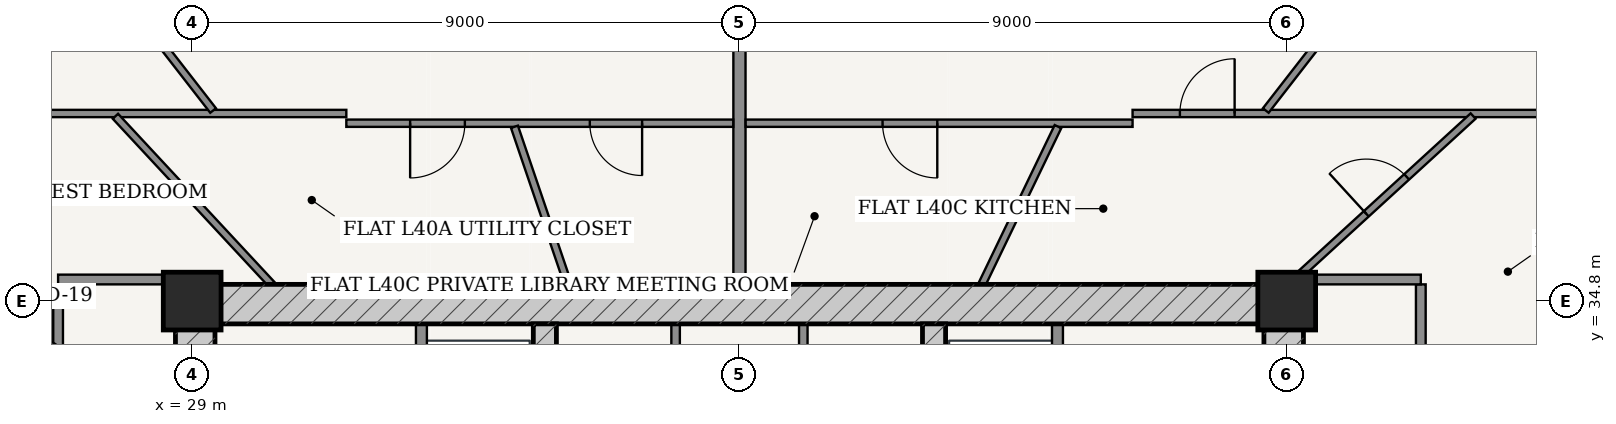
"""IFC4 building model, lengths in metres.
Left out: names, types, materials, properties, quantities, classifications, styles, units other than length and angle.
Written with IfcOpenShell. Run it as: python <this file> out.ifc"""

import sys

from ifc_helpers import new_model, si_unit, direction, frame, frame_2d, origin, origin_2d, place, context, subcontext, project, spatial, rectangle, extrude, source, transform, mapped, element, fill, save


model = new_model("IFC4")
c1 = context("Model", 3, precision=1e-05, world=origin(), true_north=direction((-0.2419218956, 0.970295726276)))
c2 = subcontext(c1, "Body", "Model", "MODEL_VIEW")
j1 = project(units=[si_unit("LENGTHUNIT", "METRE"), si_unit("PLANEANGLEUNIT", "RADIAN")], contexts=[c1])
p1 = place(None, origin())
s1 = spatial("IfcSite", under=j1, at=p1, CompositionType="ELEMENT")
p2 = place(p1, origin())
s2 = spatial("IfcBuilding", under=s1, at=p2, CompositionType="ELEMENT")
p3 = place(p2, frame((0.0, 0.0, 153.4)))
s3 = spatial("IfcBuildingStorey", under=s2, at=p3, CompositionType="ELEMENT", Elevation=153.4)
for number, where, z_axis, x_axis in (
    (1, (47.0, 34.8, 0.0), (0.0, 0.0, 1.0), (1.0, 0.0, 0.0)),
    (2, (29.0, 34.8, 0.0), (0.0, 0.0, 1.0), (1.0, 0.0, 0.0)),
):
    element("IfcColumn", number, at=place(p3, frame(where, z_axis=z_axis, x_axis=x_axis)), inside=s3, PredefinedType="COLUMN", context=c2, shape_type="SweptSolid", body=[
        extrude(rectangle(XDim=0.95, YDim=0.95, at=origin_2d()), origin(), (0.0, 0.0, 1.0), 3.6),
    ])
p4 = place(p3, frame((28.725, 34.75, 0.0), z_axis=(0.0, 0.0, 1.0), x_axis=(1.0, 0.0, 0.0)))
e3 = element("IfcWall", 3, at=p4, inside=s3, PredefinedType="SHEAR", context=c2, shape_type="SweptSolid", body=[
    extrude(rectangle(XDim=18.55, YDim=0.65, at=frame_2d((9.275, 0.0))), origin(), (0.0, 0.0, 1.0), 3.33),
])
p5 = place(p3, frame((29.05, 19.175, 0.0), z_axis=(0.0, 0.0, 1.0), x_axis=(0.0, 1.0, 0.0)))
e4 = element("IfcWall", 4, at=p5, inside=s3, PredefinedType="SHEAR", context=c2, shape_type="SweptSolid", body=[
    extrude(rectangle(XDim=15.25, YDim=0.65, at=frame_2d((7.625, 0.0))), origin(), (0.0, 0.0, 1.0), 3.33),
])
p6 = place(p5, frame((9.875, 0.0, 0.0)))
e5 = element("IfcOpeningElement", 5, at=p6, cuts=e4, PredefinedType="OPENING", context=c2, shape_type="SweptSolid", body=[
    extrude(rectangle(XDim=1.5, YDim=2.2, at=frame_2d((0.75, 1.1))), frame((0.0, 0.335, 0.0), z_axis=(0.0, -1.0, 0.0), x_axis=(1.0, 0.0, 0.0)), (0.0, 0.0, 1.0), 0.67),
])
p7 = place(p3, frame((46.95, 19.175, 0.0), z_axis=(0.0, 0.0, 1.0), x_axis=(0.0, 1.0, 0.0)))
e6 = element("IfcWall", 6, at=p7, inside=s3, PredefinedType="SHEAR", context=c2, shape_type="SweptSolid", body=[
    extrude(rectangle(XDim=15.25, YDim=0.65, at=frame_2d((7.625, 0.0))), origin(), (0.0, 0.0, 1.0), 3.33),
])
p8 = place(p7, frame((9.875, 0.0, 0.0)))
e7 = element("IfcOpeningElement", 7, at=p8, cuts=e6, PredefinedType="OPENING", context=c2, shape_type="SweptSolid", body=[
    extrude(rectangle(XDim=1.5, YDim=2.2, at=frame_2d((0.75, 1.1))), frame((0.0, 0.335, 0.0), z_axis=(0.0, -1.0, 0.0), x_axis=(1.0, 0.0, 0.0)), (0.0, 0.0, 1.0), 0.67),
])
p9 = place(p3, frame((34.8, 19.175, 0.0), z_axis=(0.0, 0.0, 1.0), x_axis=(0.0, 1.0, 0.0)))
e8 = element("IfcWall", 8, at=p9, inside=s3, PredefinedType="SHEAR", context=c2, shape_type="SweptSolid", body=[
    extrude(rectangle(XDim=15.25, YDim=0.38, at=frame_2d((7.625, 0.0))), origin(), (0.0, 0.0, 1.0), 3.33),
])
p10 = place(p9, frame((7.8, 0.0, 0.0)))
e9 = element("IfcOpeningElement", 9, at=p10, cuts=e8, PredefinedType="OPENING", context=c2, shape_type="SweptSolid", body=[
    extrude(rectangle(XDim=1.05, YDim=2.15, at=frame_2d((0.525, 1.075))), frame((0.0, 0.2, 0.0), z_axis=(0.0, -1.0, 0.0), x_axis=(1.0, 0.0, 0.0)), (0.0, 0.0, 1.0), 0.4),
])
p11 = place(p3, frame((41.2, 19.175, 0.0), z_axis=(0.0, 0.0, 1.0), x_axis=(0.0, 1.0, 0.0)))
e10 = element("IfcWall", 10, at=p11, inside=s3, PredefinedType="SHEAR", context=c2, shape_type="SweptSolid", body=[
    extrude(rectangle(XDim=15.25, YDim=0.38, at=frame_2d((7.625, 0.0))), origin(), (0.0, 0.0, 1.0), 3.33),
])
p12 = place(p11, frame((7.8, 0.0, 0.0)))
e11 = element("IfcOpeningElement", 11, at=p12, cuts=e10, PredefinedType="OPENING", context=c2, shape_type="SweptSolid", body=[
    extrude(rectangle(XDim=1.05, YDim=2.15, at=frame_2d((0.525, 1.075))), frame((0.0, 0.2, 0.0), z_axis=(0.0, -1.0, 0.0), x_axis=(1.0, 0.0, 0.0)), (0.0, 0.0, 1.0), 0.4),
])
p13 = place(p3, frame((32.77, 28.52, 0.0), z_axis=(0.0, 0.0, 1.0), x_axis=(0.0, 1.0, 0.0)))
e12 = element("IfcWall", 12, at=p13, inside=s3, PredefinedType="PARTITIONING", context=c2, shape_type="SweptSolid", body=[
    extrude(rectangle(XDim=5.905, YDim=0.18, at=frame_2d((2.953, 0.0))), origin(), (0.0, 0.0, 1.0), 3.33),
])
p14 = place(p13, frame((3.655, 0.0, 0.0)))
e13 = element("IfcOpeningElement", 13, at=p14, cuts=e12, PredefinedType="OPENING", context=c2, shape_type="SweptSolid", body=[
    extrude(rectangle(XDim=1.15, YDim=2.2, at=frame_2d((0.575, 1.1))), frame((0.0, 0.1, 0.0), z_axis=(0.0, -1.0, 0.0), x_axis=(1.0, 0.0, 0.0)), (0.0, 0.0, 1.0), 0.2),
])
p15 = place(p13, frame((0.73, 0.0, 0.0)))
e14 = element("IfcOpeningElement", 14, at=p15, cuts=e12, PredefinedType="OPENING", context=c2, shape_type="SweptSolid", body=[
    extrude(rectangle(XDim=1.2, YDim=2.25, at=frame_2d((0.6, 1.125))), frame((0.0, 0.1, 0.0), z_axis=(0.0, -1.0, 0.0), x_axis=(1.0, 0.0, 0.0)), (0.0, 0.0, 1.0), 0.2),
])
p16 = place(p3, frame((43.23, 28.52, 0.0), z_axis=(0.0, 0.0, 1.0), x_axis=(0.0, 1.0, 0.0)))
e15 = element("IfcWall", 15, at=p16, inside=s3, PredefinedType="PARTITIONING", context=c2, shape_type="SweptSolid", body=[
    extrude(rectangle(XDim=5.905, YDim=0.18, at=frame_2d((2.953, 0.0))), origin(), (0.0, 0.0, 1.0), 3.33),
])
p17 = place(p16, frame((0.905, 0.0, 0.0)))
e16 = element("IfcOpeningElement", 16, at=p17, cuts=e15, PredefinedType="OPENING", context=c2, shape_type="SweptSolid", body=[
    extrude(rectangle(XDim=0.85, YDim=2.1, at=frame_2d((0.425, 1.05))), frame((0.0, 0.1, 0.0), z_axis=(0.0, -1.0, 0.0), x_axis=(1.0, 0.0, 0.0)), (0.0, 0.0, 1.0), 0.2),
])
p18 = place(p16, frame((3.655, 0.0, 0.0)))
e17 = element("IfcOpeningElement", 17, at=p18, cuts=e15, PredefinedType="OPENING", context=c2, shape_type="SweptSolid", body=[
    extrude(rectangle(XDim=1.15, YDim=2.2, at=frame_2d((0.575, 1.1))), frame((0.0, 0.1, 0.0), z_axis=(0.0, -1.0, 0.0), x_axis=(1.0, 0.0, 0.0)), (0.0, 0.0, 1.0), 0.2),
])
for number, where, z_axis, x_axis in (
    (18, (36.95, 28.56, 0.0), (0.0, 0.0, 1.0), (0.0, 1.0, 0.0)),
    (19, (39.05, 28.56, 0.0), (0.0, 0.0, 1.0), (0.0, 1.0, 0.0)),
):
    element("IfcWall", number, at=place(p3, frame(where, z_axis=z_axis, x_axis=x_axis)), inside=s3, PredefinedType="PARTITIONING", context=c2, shape_type="SweptSolid", body=[
        extrude(rectangle(XDim=5.865, YDim=0.14, at=frame_2d((2.933, 0.0))), origin(), (0.0, 0.0, 1.0), 3.33),
    ])
p19 = place(p3, frame((26.795, 24.4, 0.0), z_axis=(0.0, 0.0, 1.0), x_axis=(0.0, 1.0, 0.0)))
e20 = element("IfcWall", 20, at=p19, inside=s3, PredefinedType="PARTITIONING", context=c2, shape_type="SweptSolid", body=[
    extrude(rectangle(XDim=10.675, YDim=0.16, at=frame_2d((5.337, 0.0))), origin(), (0.0, 0.0, 1.0), 2.776),
])
p20 = place(p19, frame((6.702, 0.0, 0.0)))
e21 = element("IfcOpeningElement", 21, at=p20, cuts=e20, PredefinedType="OPENING", context=c2, shape_type="SweptSolid", body=[
    extrude(rectangle(XDim=0.98, YDim=2.2, at=frame_2d((0.49, 1.1))), frame((0.0, 0.09, 0.0), z_axis=(0.0, -1.0, 0.0), x_axis=(1.0, 0.0, 0.0)), (0.0, 0.0, 1.0), 0.18),
])
p21 = place(p3, frame((26.795, 35.155, 0.0), z_axis=(0.0, 0.0, 1.0), x_axis=(1.0, 0.0, 0.0)))
e22 = element("IfcWall", 22, at=p21, inside=s3, PredefinedType="PARTITIONING", context=c2, shape_type="SweptSolid", body=[
    extrude(rectangle(XDim=1.93, YDim=0.16, at=frame_2d((0.965, 0.0))), origin(), (0.0, 0.0, 1.0), 2.776),
])
p22 = place(p3, frame((49.205, 16.675, 0.0), z_axis=(0.0, 0.0, 1.0), x_axis=(0.0, 1.0, 0.0)))
e23 = element("IfcWall", 23, at=p22, inside=s3, PredefinedType="PARTITIONING", context=c2, shape_type="SweptSolid", body=[
    extrude(rectangle(XDim=18.4, YDim=0.16, at=frame_2d((9.2, 0.0))), origin(), (0.0, 0.0, 1.0), 2.776),
])
p23 = place(p22, frame((15.299, 0.0, 0.0)))
e24 = element("IfcOpeningElement", 24, at=p23, cuts=e23, PredefinedType="OPENING", context=c2, shape_type="SweptSolid", body=[
    extrude(rectangle(XDim=0.98, YDim=2.2, at=frame_2d((0.49, 1.1))), frame((0.0, 0.09, 0.0), z_axis=(0.0, -1.0, 0.0), x_axis=(1.0, 0.0, 0.0)), (0.0, 0.0, 1.0), 0.18),
])
p24 = place(p3, frame((47.275, 35.155, 0.0), z_axis=(0.0, 0.0, 1.0), x_axis=(1.0, 0.0, 0.0)))
e25 = element("IfcWall", 25, at=p24, inside=s3, PredefinedType="PARTITIONING", context=c2, shape_type="SweptSolid", body=[
    extrude(rectangle(XDim=1.93, YDim=0.16, at=frame_2d((0.965, 0.0))), origin(), (0.0, 0.0, 1.0), 2.776),
])
p25 = place(p3, frame((38.0, 35.075, 0.0), z_axis=(0.0, 0.0, 1.0), x_axis=(0.0, 1.0, 0.0)))
e26 = element("IfcWall", 26, at=p25, inside=s3, PredefinedType="PARTITIONING", context=c2, shape_type="SweptSolid", body=[
    extrude(rectangle(XDim=12.465, YDim=0.2, at=frame_2d((6.232, 0.0))), origin(), (0.0, 0.0, 1.0), 2.415),
])
p26 = place(p3, frame((24.065, 37.885, 0.0), z_axis=(0.0, 0.0, 1.0), x_axis=(1.0, 0.0, 0.0)))
e27 = element("IfcWall", 27, at=p26, inside=s3, PredefinedType="PARTITIONING", context=c2, shape_type="SweptSolid", body=[
    extrude(rectangle(XDim=7.47, YDim=0.12, at=frame_2d((3.735, 0.0))), origin(), (0.0, 0.0, 1.0), 2.776),
])
p27 = place(p3, frame((31.535, 37.725, 0.0), z_axis=(0.0, 0.0, 1.0), x_axis=(1.0, 0.0, 0.0)))
e28 = element("IfcWall", 28, at=p27, inside=s3, PredefinedType="PARTITIONING", context=c2, shape_type="SweptSolid", body=[
    extrude(rectangle(XDim=6.363, YDim=0.12, at=frame_2d((3.182, 0.0))), origin(), (0.0, 0.0, 1.0), 2.776),
])
p28 = place(p27, frame((4.004, 0.0, 0.0)))
e29 = element("IfcOpeningElement", 29, at=p28, cuts=e28, PredefinedType="OPENING", context=c2, shape_type="SweptSolid", body=[
    extrude(rectangle(XDim=0.86, YDim=2.15, at=frame_2d((0.43, 1.075))), frame((0.0, 0.07, 0.0), z_axis=(0.0, -1.0, 0.0), x_axis=(1.0, 0.0, 0.0)), (0.0, 0.0, 1.0), 0.14),
])
p29 = place(p27, frame((1.049, 0.0, 0.0)))
e30 = element("IfcOpeningElement", 30, at=p29, cuts=e28, PredefinedType="OPENING", context=c2, shape_type="SweptSolid", body=[
    extrude(rectangle(XDim=0.9, YDim=2.15, at=frame_2d((0.45, 1.075))), frame((0.0, 0.07, 0.0), z_axis=(0.0, -1.0, 0.0), x_axis=(1.0, 0.0, 0.0)), (0.0, 0.0, 1.0), 0.14),
])
p30 = place(p3, frame((29.344, 37.934, 0.0), z_axis=(0.0, 0.0, 1.0), x_axis=(-0.613758289074, 0.789493991487, 0.0)))
e31 = element("IfcWall", 31, at=p30, inside=s3, PredefinedType="PARTITIONING", context=c2, shape_type="SweptSolid", body=[
    extrude(rectangle(XDim=7.695, YDim=0.12, at=frame_2d((3.848, 0.0))), origin(), (0.0, 0.0, 1.0), 2.776),
])
p31 = place(p30, frame((2.399, 0.0, 0.0)))
e32 = element("IfcOpeningElement", 32, at=p31, cuts=e31, PredefinedType="OPENING", context=c2, shape_type="SweptSolid", body=[
    extrude(rectangle(XDim=0.9, YDim=2.15, at=frame_2d((0.45, 1.075))), frame((0.0, 0.07, 0.0), z_axis=(0.0, -1.0, 0.0), x_axis=(1.0, 0.0, 0.0)), (0.0, 0.0, 1.0), 0.14),
])
p32 = place(p3, frame((35.182, 35.075, 0.0), z_axis=(0.0, 0.0, 1.0), x_axis=(-0.322321614946, 0.946630221649, 0.0)))
e33 = element("IfcWall", 33, at=p32, inside=s3, PredefinedType="PARTITIONING", context=c2, shape_type="SweptSolid", body=[
    extrude(rectangle(XDim=2.737, YDim=0.12, at=frame_2d((1.369, 0.0))), origin(), (0.0, 0.0, 1.0), 2.415),
])
p33 = place(p3, frame((30.307, 35.075, 0.0), z_axis=(0.0, 0.0, 1.0), x_axis=(-0.68082810609, 0.732443233267, 0.0)))
e34 = element("IfcWall", 34, at=p33, inside=s3, PredefinedType="PARTITIONING", context=c2, shape_type="SweptSolid", body=[
    extrude(rectangle(XDim=3.775, YDim=0.12, at=frame_2d((1.887, 0.0))), origin(), (0.0, 0.0, 1.0), 2.776),
])
p34 = place(p3, frame((26.715, 34.043, 0.0), z_axis=(0.0, 0.0, 1.0), x_axis=(-0.841597086151, 0.540105864235, 0.0)))
e35 = element("IfcWall", 35, at=p34, inside=s3, PredefinedType="PARTITIONING", context=c2, shape_type="SweptSolid", body=[
    extrude(rectangle(XDim=3.087, YDim=0.12, at=frame_2d((1.543, 0.0))), origin(), (0.0, 0.0, 1.0), 3.005),
])
p35 = place(p34, frame((1.113, 0.0, 0.0)))
e36 = element("IfcOpeningElement", 36, at=p35, cuts=e35, PredefinedType="OPENING", context=c2, shape_type="SweptSolid", body=[
    extrude(rectangle(XDim=0.86, YDim=2.15, at=frame_2d((0.43, 1.075))), frame((0.0, 0.07, 0.0), z_axis=(0.0, -1.0, 0.0), x_axis=(1.0, 0.0, 0.0)), (0.0, 0.0, 1.0), 0.14),
])
p36 = place(p3, frame((38.102, 37.725, 0.0), z_axis=(0.0, 0.0, 1.0), x_axis=(1.0, 0.0, 0.0)))
e37 = element("IfcWall", 37, at=p36, inside=s3, PredefinedType="PARTITIONING", context=c2, shape_type="SweptSolid", body=[
    extrude(rectangle(XDim=6.363, YDim=0.12, at=frame_2d((3.182, 0.0))), origin(), (0.0, 0.0, 1.0), 2.776),
])
p37 = place(p36, frame((2.251, 0.0, 0.0)))
e38 = element("IfcOpeningElement", 38, at=p37, cuts=e37, PredefinedType="OPENING", context=c2, shape_type="SweptSolid", body=[
    extrude(rectangle(XDim=0.9, YDim=2.15, at=frame_2d((0.45, 1.075))), frame((0.0, 0.07, 0.0), z_axis=(0.0, -1.0, 0.0), x_axis=(1.0, 0.0, 0.0)), (0.0, 0.0, 1.0), 0.14),
])
p38 = place(p3, frame((44.465, 37.885, 0.0), z_axis=(0.0, 0.0, 1.0), x_axis=(1.0, 0.0, 0.0)))
e39 = element("IfcWall", 39, at=p38, inside=s3, PredefinedType="PARTITIONING", context=c2, shape_type="SweptSolid", body=[
    extrude(rectangle(XDim=7.47, YDim=0.12, at=frame_2d((3.735, 0.0))), origin(), (0.0, 0.0, 1.0), 2.776),
])
p39 = place(p38, frame((0.778, 0.0, 0.0)))
e40 = element("IfcOpeningElement", 40, at=p39, cuts=e39, PredefinedType="OPENING", context=c2, shape_type="SweptSolid", body=[
    extrude(rectangle(XDim=0.9, YDim=2.15, at=frame_2d((0.45, 1.075))), frame((0.0, 0.07, 0.0), z_axis=(0.0, -1.0, 0.0), x_axis=(1.0, 0.0, 0.0)), (0.0, 0.0, 1.0), 0.14),
])
p40 = place(p3, frame((46.656, 37.934, 0.0), z_axis=(0.0, 0.0, 1.0), x_axis=(0.613758289074, 0.789493991487, 0.0)))
e41 = element("IfcWall", 41, at=p40, inside=s3, PredefinedType="PARTITIONING", context=c2, shape_type="SweptSolid", body=[
    extrude(rectangle(XDim=7.695, YDim=0.12, at=frame_2d((3.848, 0.0))), origin(), (0.0, 0.0, 1.0), 2.776),
])
p41 = place(p40, frame((2.395, 0.0, 0.0)))
e42 = element("IfcOpeningElement", 42, at=p41, cuts=e41, PredefinedType="OPENING", context=c2, shape_type="SweptSolid", body=[
    extrude(rectangle(XDim=0.9, YDim=2.15, at=frame_2d((0.45, 1.075))), frame((0.0, 0.07, 0.0), z_axis=(0.0, -1.0, 0.0), x_axis=(1.0, 0.0, 0.0)), (0.0, 0.0, 1.0), 0.14),
])
p42 = place(p3, frame((47.216, 35.235, 0.0), z_axis=(0.0, 0.0, 1.0), x_axis=(0.73766811085, 0.675163504816, 0.0)))
e43 = element("IfcWall", 43, at=p42, inside=s3, PredefinedType="PARTITIONING", context=c2, shape_type="SweptSolid", body=[
    extrude(rectangle(XDim=3.863, YDim=0.12, at=frame_2d((1.932, 0.0))), origin(), (0.0, 0.0, 1.0), 2.776),
])
p43 = place(p42, frame((1.481, 0.0, 0.0)))
e44 = element("IfcOpeningElement", 44, at=p43, cuts=e43, PredefinedType="OPENING", context=c2, shape_type="SweptSolid", body=[
    extrude(rectangle(XDim=0.9, YDim=2.15, at=frame_2d((0.45, 1.075))), frame((0.0, 0.07, 0.0), z_axis=(0.0, -1.0, 0.0), x_axis=(1.0, 0.0, 0.0)), (0.0, 0.0, 1.0), 0.14),
])
p44 = place(p3, frame((41.988, 35.075, 0.0), z_axis=(0.0, 0.0, 1.0), x_axis=(0.434144408634, 0.900843289619, 0.0)))
e45 = element("IfcWall", 45, at=p44, inside=s3, PredefinedType="PARTITIONING", context=c2, shape_type="SweptSolid", body=[
    extrude(rectangle(XDim=2.88, YDim=0.12, at=frame_2d((1.44, 0.0))), origin(), (0.0, 0.0, 1.0), 3.33),
])
m1 = source(origin(), c2, "Body", "SweptSolid", [
    extrude(rectangle(XDim=0.86, YDim=2.15, at=frame_2d((0.43, 1.075))), frame((0.0, 0.025, 0.0), z_axis=(0.0, -1.0, 0.0), x_axis=(1.0, 0.0, 0.0)), (0.0, 0.0, 1.0), 0.05),
])
p45 = place(p28, frame((0.86, 0.0, 0.0), z_axis=(0.0, 0.0, 1.0), x_axis=(-1.0, 0.0, 0.0)))
e46 = element("IfcDoor", 46, at=p45, inside=s3, OperationType="SINGLE_SWING_LEFT", PredefinedType="DOOR", context=c2, shape_type="MappedRepresentation", body=[
    mapped(m1, transform((0.0, 0.0, 0.0), scale=1.0)),
])
fill(e29, e46)
m2 = source(origin(), c2, "Body", "SweptSolid", [
    extrude(rectangle(XDim=0.9, YDim=2.15, at=frame_2d((0.45, 1.075))), frame((0.0, 0.025, 0.0), z_axis=(0.0, -1.0, 0.0), x_axis=(1.0, 0.0, 0.0)), (0.0, 0.0, 1.0), 0.05),
])
p46 = place(p29, frame((0.9, 0.0, 0.0), z_axis=(0.0, 0.0, 1.0), x_axis=(-1.0, 0.0, 0.0)))
e47 = element("IfcDoor", 47, at=p46, inside=s3, OperationType="SINGLE_SWING_RIGHT", PredefinedType="DOOR", context=c2, shape_type="MappedRepresentation", body=[
    mapped(m2, transform((0.0, 0.0, 0.0), scale=1.0)),
])
fill(e30, e47)
p47 = place(p43, origin())
e48 = element("IfcDoor", 48, at=p47, inside=s3, OperationType="SINGLE_SWING_LEFT", PredefinedType="DOOR", context=c2, shape_type="MappedRepresentation", body=[
    mapped(m2, transform((0.0, 0.0, 0.0), scale=1.0)),
])
fill(e44, e48)
p48 = place(p39, origin())
e49 = element("IfcDoor", 49, at=p48, inside=s3, OperationType="SINGLE_SWING_RIGHT", PredefinedType="DOOR", context=c2, shape_type="MappedRepresentation", body=[
    mapped(m2, transform((0.0, 0.0, 0.0), scale=1.0)),
])
fill(e40, e49)
p49 = place(p37, frame((0.9, 0.0, 0.0), z_axis=(0.0, 0.0, 1.0), x_axis=(-1.0, 0.0, 0.0)))
e50 = element("IfcDoor", 50, at=p49, inside=s3, OperationType="SINGLE_SWING_LEFT", PredefinedType="DOOR", context=c2, shape_type="MappedRepresentation", body=[
    mapped(m2, transform((0.0, 0.0, 0.0), scale=1.0)),
])
fill(e38, e50)
save(model, sys.argv[1])
